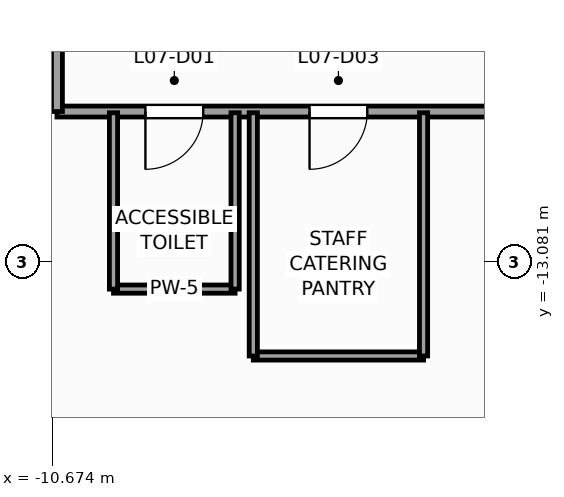
"""IFC4 building model, lengths in metres.
Left out: names, types, materials, properties, quantities, classifications, styles, units other than length and angle.
Written with IfcOpenShell. Run it as: python <this file> out.ifc"""

import sys

from ifc_helpers import new_model, si_unit, direction, frame, frame_2d, origin, place, context, subcontext, project, spatial, rectangle, extrude, source, transform, mapped, element, fill, save


model = new_model("IFC4")
c1 = context("Model", 3, precision=1e-05, world=origin(), true_north=direction((0.0, 1.0)))
c2 = subcontext(c1, "Body", "Model", "MODEL_VIEW")
j1 = project(units=[si_unit("LENGTHUNIT", "METRE"), si_unit("PLANEANGLEUNIT", "RADIAN")], contexts=[c1])
p1 = place(None, origin())
s1 = spatial("IfcSite", under=j1, at=p1, CompositionType="ELEMENT")
p2 = place(p1, origin())
s2 = spatial("IfcBuilding", under=s1, at=p2, CompositionType="ELEMENT")
p3 = place(p2, frame((0.0, 0.0, 34.0)))
s3 = spatial("IfcBuildingStorey", under=s2, at=p3, CompositionType="ELEMENT", Elevation=34.0)
p4 = place(p3, frame((-10.6, -10.6, 0.0), z_axis=(0.0, 0.0, 1.0), x_axis=(1.0, 0.0, 0.0)))
e1 = element("IfcWall", 1, at=p4, inside=s3, PredefinedType="PARTITIONING", context=c2, shape_type="SweptSolid", body=[
    extrude(rectangle(XDim=9.45, YDim=0.18, at=frame_2d((4.725, 0.0))), origin(), (0.0, 0.0, 1.0), 3.72),
])
p5 = place(p4, frame((1.455, 0.0, 0.0)))
e2 = element("IfcOpeningElement", 2, at=p5, cuts=e1, PredefinedType="OPENING", context=c2, shape_type="SweptSolid", body=[
    extrude(rectangle(XDim=0.95, YDim=2.1, at=frame_2d((0.475, 1.05))), frame((0.0, 0.1, 0.0), z_axis=(0.0, -1.0, 0.0), x_axis=(1.0, 0.0, 0.0)), (0.0, 0.0, 1.0), 0.2),
])
p6 = place(p4, frame((4.154, 0.0, 0.0)))
e3 = element("IfcOpeningElement", 3, at=p6, cuts=e1, PredefinedType="OPENING", context=c2, shape_type="SweptSolid", body=[
    extrude(rectangle(XDim=0.95, YDim=2.1, at=frame_2d((0.475, 1.05))), frame((0.0, 0.1, 0.0), z_axis=(0.0, -1.0, 0.0), x_axis=(1.0, 0.0, 0.0)), (0.0, 0.0, 1.0), 0.2),
])
p7 = place(p3, frame((-10.6, -10.6, 0.0), z_axis=(0.0, 0.0, 1.0), x_axis=(0.0, 1.0, 0.0)))
e4 = element("IfcWall", 4, at=p7, inside=s3, PredefinedType="PARTITIONING", context=c2, shape_type="SweptSolid", body=[
    extrude(rectangle(XDim=9.45, YDim=0.18, at=frame_2d((4.725, 0.0))), origin(), (0.0, 0.0, 1.0), 3.72),
])
p8 = place(p3, frame((-9.67, -13.52, 0.0), z_axis=(0.0, 0.0, 1.0), x_axis=(1.0, 0.0, 0.0)))
e5 = element("IfcWall", 5, at=p8, inside=s3, PredefinedType="PARTITIONING", context=c2, shape_type="SweptSolid", body=[
    extrude(rectangle(XDim=2.0, YDim=0.135, at=frame_2d((1.0, 0.0))), origin(), (0.0, 0.0, 1.0), 3.72),
])
for number, where, z_axis, x_axis in (
    (6, (-7.67, -13.52, 0.0), (0.0, 0.0, 1.0), (0.0, 1.0, 0.0)),
    (7, (-9.67, -13.52, 0.0), (0.0, 0.0, 1.0), (0.0, 1.0, 0.0)),
):
    element("IfcWall", number, at=place(p3, frame(where, z_axis=z_axis, x_axis=x_axis)), inside=s3, PredefinedType="PARTITIONING", context=c2, shape_type="SweptSolid", body=[
        extrude(rectangle(XDim=2.9, YDim=0.135, at=frame_2d((1.45, 0.0))), origin(), (0.0, 0.0, 1.0), 3.72),
    ])
p9 = place(p3, frame((-7.371, -14.62, 0.0), z_axis=(0.0, 0.0, 1.0), x_axis=(1.0, 0.0, 0.0)))
e8 = element("IfcWall", 8, at=p9, inside=s3, PredefinedType="PARTITIONING", context=c2, shape_type="SweptSolid", body=[
    extrude(rectangle(XDim=2.8, YDim=0.135, at=frame_2d((1.4, 0.0))), origin(), (0.0, 0.0, 1.0), 3.72),
])
for number, where, z_axis, x_axis in (
    (9, (-4.571, -14.62, 0.0), (0.0, 0.0, 1.0), (0.0, 1.0, 0.0)),
    (10, (-7.371, -14.62, 0.0), (0.0, 0.0, 1.0), (0.0, 1.0, 0.0)),
):
    element("IfcWall", number, at=place(p3, frame(where, z_axis=z_axis, x_axis=x_axis)), inside=s3, PredefinedType="PARTITIONING", context=c2, shape_type="SweptSolid", body=[
        extrude(rectangle(XDim=4.0, YDim=0.135, at=frame_2d((2.0, 0.0))), origin(), (0.0, 0.0, 1.0), 3.72),
    ])
m1 = source(origin(), c2, "Body", "SweptSolid", [
    extrude(rectangle(XDim=0.95, YDim=2.1, at=frame_2d((0.475, 1.05))), frame((0.0, 0.025, 0.0), z_axis=(0.0, -1.0, 0.0), x_axis=(1.0, 0.0, 0.0)), (0.0, 0.0, 1.0), 0.05),
])
p10 = place(p5, frame((0.95, 0.0, 0.0), z_axis=(0.0, 0.0, 1.0), x_axis=(-1.0, 0.0, 0.0)))
e11 = element("IfcDoor", 11, at=p10, inside=s3, OperationType="SINGLE_SWING_LEFT", PredefinedType="DOOR", context=c2, shape_type="MappedRepresentation", body=[
    mapped(m1, transform((0.0, 0.0, 0.0), scale=1.0)),
])
fill(e2, e11)
p11 = place(p6, frame((0.95, 0.0, 0.0), z_axis=(0.0, 0.0, 1.0), x_axis=(-1.0, 0.0, 0.0)))
e12 = element("IfcDoor", 12, at=p11, inside=s3, OperationType="SINGLE_SWING_LEFT", PredefinedType="DOOR", context=c2, shape_type="MappedRepresentation", body=[
    mapped(m1, transform((0.0, 0.0, 0.0), scale=1.0)),
])
fill(e3, e12)
save(model, sys.argv[1])
